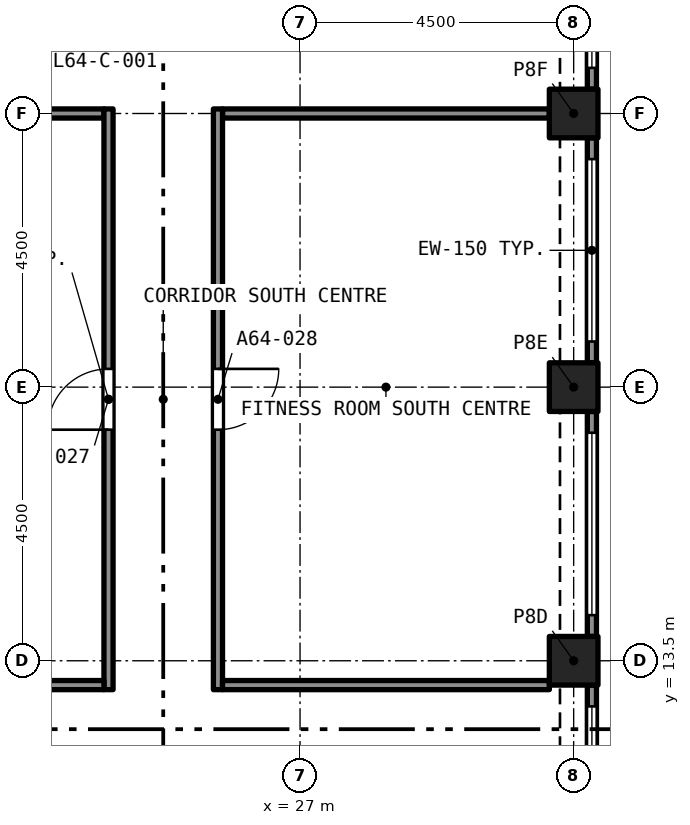
"""IFC4 building model, lengths in metres.
Left out: names, types, materials, properties, quantities, classifications, styles, units other than length and angle.
Written with IfcOpenShell. Run it as: python <this file> out.ifc"""

import sys

from ifc_helpers import new_model, si_unit, direction, frame, frame_2d, origin, origin_2d, place, context, subcontext, project, spatial, rectangle, extrude, element, fill, save


model = new_model("IFC4")
c1 = context("Model", 3, precision=1e-05, world=origin(), true_north=direction((0.0, 1.0)))
c2 = subcontext(c1, "Body", "Model", "MODEL_VIEW")
j1 = project(units=[si_unit("LENGTHUNIT", "METRE"), si_unit("PLANEANGLEUNIT", "RADIAN")], contexts=[c1])
p1 = place(None, origin())
s1 = spatial("IfcSite", under=j1, at=p1, CompositionType="ELEMENT")
p2 = place(p1, origin())
s2 = spatial("IfcBuilding", under=s1, at=p2, CompositionType="ELEMENT")
p3 = place(p2, frame((0.0, 0.0, 229.295)))
s3 = spatial("IfcBuildingStorey", under=s2, at=p3, CompositionType="ELEMENT", Elevation=229.295)
for number, where, z_axis, x_axis in (
    (1, (31.5, 13.5, 0.0), (0.0, 0.0, 1.0), (1.0, 0.0, 0.0)),
    (2, (31.5, 18.0, 0.0), (0.0, 0.0, 1.0), (1.0, 0.0, 0.0)),
    (3, (31.5, 22.5, 0.0), (0.0, 0.0, 1.0), (1.0, 0.0, 0.0)),
):
    element("IfcColumn", number, at=place(p3, frame(where, z_axis=z_axis, x_axis=x_axis)), inside=s3, PredefinedType="COLUMN", context=c2, shape_type="SweptSolid", body=[
        extrude(rectangle(XDim=0.8, YDim=0.8, at=origin_2d()), origin(), (0.0, 0.0, 1.0), 3.2),
    ])
p4 = place(p3, frame((31.8, 13.1, 0.0), z_axis=(0.0, 0.0, 1.0), x_axis=(0.0, -1.0, 0.0)))
e4 = element("IfcWall", 4, at=p4, inside=s3, PredefinedType="SOLIDWALL", context=c2, shape_type="SweptSolid", body=[
    extrude(rectangle(XDim=3.7, YDim=0.15, at=frame_2d((1.85, 0.0))), origin(), (0.0, 0.0, 1.0), 3.2),
])
p5 = place(p4, frame((0.35, 0.0, 0.45)))
e5 = element("IfcOpeningElement", 5, at=p5, cuts=e4, PredefinedType="OPENING", context=c2, shape_type="SweptSolid", body=[
    extrude(rectangle(XDim=3.0, YDim=1.95, at=frame_2d((1.5, 0.975))), frame((0.0, 0.085, 0.0), z_axis=(0.0, -1.0, 0.0), x_axis=(1.0, 0.0, 0.0)), (0.0, 0.0, 1.0), 0.17),
])
p6 = place(p3, frame((31.8, 17.6, 0.0), z_axis=(0.0, 0.0, 1.0), x_axis=(0.0, -1.0, 0.0)))
e6 = element("IfcWall", 6, at=p6, inside=s3, PredefinedType="SOLIDWALL", context=c2, shape_type="SweptSolid", body=[
    extrude(rectangle(XDim=3.7, YDim=0.15, at=frame_2d((1.85, 0.0))), origin(), (0.0, 0.0, 1.0), 3.2),
])
p7 = place(p6, frame((0.35, 0.0, 0.45)))
e7 = element("IfcOpeningElement", 7, at=p7, cuts=e6, PredefinedType="OPENING", context=c2, shape_type="SweptSolid", body=[
    extrude(rectangle(XDim=3.0, YDim=1.95, at=frame_2d((1.5, 0.975))), frame((0.0, 0.085, 0.0), z_axis=(0.0, -1.0, 0.0), x_axis=(1.0, 0.0, 0.0)), (0.0, 0.0, 1.0), 0.17),
])
p8 = place(p3, frame((31.8, 22.1, 0.0), z_axis=(0.0, 0.0, 1.0), x_axis=(0.0, -1.0, 0.0)))
e8 = element("IfcWall", 8, at=p8, inside=s3, PredefinedType="SOLIDWALL", context=c2, shape_type="SweptSolid", body=[
    extrude(rectangle(XDim=3.7, YDim=0.15, at=frame_2d((1.85, 0.0))), origin(), (0.0, 0.0, 1.0), 3.2),
])
p9 = place(p8, frame((0.35, 0.0, 0.45)))
e9 = element("IfcOpeningElement", 9, at=p9, cuts=e8, PredefinedType="OPENING", context=c2, shape_type="SweptSolid", body=[
    extrude(rectangle(XDim=3.0, YDim=1.95, at=frame_2d((1.5, 0.975))), frame((0.0, 0.085, 0.0), z_axis=(0.0, -1.0, 0.0), x_axis=(1.0, 0.0, 0.0)), (0.0, 0.0, 1.0), 0.17),
])
p10 = place(p3, frame((31.8, 26.6, 0.0), z_axis=(0.0, 0.0, 1.0), x_axis=(0.0, -1.0, 0.0)))
e10 = element("IfcWall", 10, at=p10, inside=s3, PredefinedType="SOLIDWALL", context=c2, shape_type="SweptSolid", body=[
    extrude(rectangle(XDim=3.7, YDim=0.15, at=frame_2d((1.85, 0.0))), origin(), (0.0, 0.0, 1.0), 3.2),
])
p11 = place(p10, frame((0.35, 0.0, 0.45)))
e11 = element("IfcOpeningElement", 11, at=p11, cuts=e10, PredefinedType="OPENING", context=c2, shape_type="SweptSolid", body=[
    extrude(rectangle(XDim=3.0, YDim=1.95, at=frame_2d((1.5, 0.975))), frame((0.0, 0.085, 0.0), z_axis=(0.0, -1.0, 0.0), x_axis=(1.0, 0.0, 0.0)), (0.0, 0.0, 1.0), 0.17),
])
for number, where, z_axis, x_axis in (
    (12, (18.4, 22.5, 0.0), (0.0, 0.0, 1.0), (1.0, 0.0, 0.0)),
    (13, (25.725, 22.5, 0.0), (0.0, 0.0, 1.0), (1.0, 0.0, 0.0)),
):
    element("IfcWall", number, at=place(p3, frame(where, z_axis=z_axis, x_axis=x_axis)), inside=s3, PredefinedType="PARTITIONING", context=c2, shape_type="SweptSolid", body=[
        extrude(rectangle(XDim=5.375, YDim=0.15, at=frame_2d((2.688, 0.0))), origin(), (0.0, 0.0, 1.0), 2.75),
    ])
p12 = place(p3, frame((23.85, 13.025, 0.0), z_axis=(0.0, 0.0, 1.0), x_axis=(0.0, 1.0, 0.0)))
e14 = element("IfcWall", 14, at=p12, inside=s3, PredefinedType="PARTITIONING", context=c2, shape_type="SweptSolid", body=[
    extrude(rectangle(XDim=9.55, YDim=0.15, at=frame_2d((4.775, 0.0))), origin(), (0.0, 0.0, 1.0), 2.75),
])
p13 = place(p12, frame((4.275, 0.0, 0.0)))
e15 = element("IfcOpeningElement", 15, at=p13, cuts=e14, PredefinedType="OPENING", context=c2, shape_type="SweptSolid", body=[
    extrude(rectangle(XDim=1.0, YDim=2.1, at=frame_2d((0.5, 1.05))), frame((0.0, 0.085, 0.0), z_axis=(0.0, -1.0, 0.0), x_axis=(1.0, 0.0, 0.0)), (0.0, 0.0, 1.0), 0.17),
])
p14 = place(p3, frame((25.65, 22.575, 0.0), z_axis=(0.0, 0.0, 1.0), x_axis=(0.0, -1.0, 0.0)))
e16 = element("IfcWall", 16, at=p14, inside=s3, PredefinedType="PARTITIONING", context=c2, shape_type="SweptSolid", body=[
    extrude(rectangle(XDim=9.55, YDim=0.15, at=frame_2d((4.775, 0.0))), origin(), (0.0, 0.0, 1.0), 2.75),
])
p15 = place(p14, frame((4.275, 0.0, 0.0)))
e17 = element("IfcOpeningElement", 17, at=p15, cuts=e16, PredefinedType="OPENING", context=c2, shape_type="SweptSolid", body=[
    extrude(rectangle(XDim=1.0, YDim=2.1, at=frame_2d((0.5, 1.05))), frame((0.0, 0.085, 0.0), z_axis=(0.0, -1.0, 0.0), x_axis=(1.0, 0.0, 0.0)), (0.0, 0.0, 1.0), 0.17),
])
for number, where, z_axis, x_axis in (
    (18, (18.4, 13.1, 0.0), (0.0, 0.0, 1.0), (1.0, 0.0, 0.0)),
    (19, (25.725, 13.1, 0.0), (0.0, 0.0, 1.0), (1.0, 0.0, 0.0)),
):
    element("IfcWall", number, at=place(p3, frame(where, z_axis=z_axis, x_axis=x_axis)), inside=s3, PredefinedType="PARTITIONING", context=c2, shape_type="SweptSolid", body=[
        extrude(rectangle(XDim=5.375, YDim=0.15, at=frame_2d((2.688, 0.0))), origin(), (0.0, 0.0, 1.0), 2.75),
    ])
p16 = place(p5, origin())
e20 = element("IfcWindow", 20, at=p16, inside=s3, PartitioningType="SINGLE_PANEL", PredefinedType="WINDOW", context=c2, shape_type="SweptSolid", body=[
    extrude(rectangle(XDim=3.0, YDim=1.95, at=frame_2d((1.5, 0.975))), frame((0.0, 0.03, 0.0), z_axis=(0.0, -1.0, 0.0), x_axis=(1.0, 0.0, 0.0)), (0.0, 0.0, 1.0), 0.06),
])
fill(e5, e20)
p17 = place(p7, origin())
e21 = element("IfcWindow", 21, at=p17, inside=s3, PartitioningType="SINGLE_PANEL", PredefinedType="WINDOW", context=c2, shape_type="SweptSolid", body=[
    extrude(rectangle(XDim=3.0, YDim=1.95, at=frame_2d((1.5, 0.975))), frame((0.0, 0.03, 0.0), z_axis=(0.0, -1.0, 0.0), x_axis=(1.0, 0.0, 0.0)), (0.0, 0.0, 1.0), 0.06),
])
fill(e7, e21)
p18 = place(p9, origin())
e22 = element("IfcWindow", 22, at=p18, inside=s3, PartitioningType="SINGLE_PANEL", PredefinedType="WINDOW", context=c2, shape_type="SweptSolid", body=[
    extrude(rectangle(XDim=3.0, YDim=1.95, at=frame_2d((1.5, 0.975))), frame((0.0, 0.03, 0.0), z_axis=(0.0, -1.0, 0.0), x_axis=(1.0, 0.0, 0.0)), (0.0, 0.0, 1.0), 0.06),
])
fill(e9, e22)
p19 = place(p11, origin())
e23 = element("IfcWindow", 23, at=p19, inside=s3, PartitioningType="SINGLE_PANEL", PredefinedType="WINDOW", context=c2, shape_type="SweptSolid", body=[
    extrude(rectangle(XDim=3.0, YDim=1.95, at=frame_2d((1.5, 0.975))), frame((0.0, 0.03, 0.0), z_axis=(0.0, -1.0, 0.0), x_axis=(1.0, 0.0, 0.0)), (0.0, 0.0, 1.0), 0.06),
])
fill(e11, e23)
p20 = place(p13, origin())
e24 = element("IfcDoor", 24, at=p20, inside=s3, OperationType="SINGLE_SWING_RIGHT", PredefinedType="DOOR", context=c2, shape_type="SweptSolid", body=[
    extrude(rectangle(XDim=1.0, YDim=2.1, at=frame_2d((0.5, 1.05))), frame((0.0, 0.025, 0.0), z_axis=(0.0, -1.0, 0.0), x_axis=(1.0, 0.0, 0.0)), (0.0, 0.0, 1.0), 0.05),
])
fill(e15, e24)
p21 = place(p15, origin())
e25 = element("IfcDoor", 25, at=p21, inside=s3, OperationType="SINGLE_SWING_LEFT", PredefinedType="DOOR", context=c2, shape_type="SweptSolid", body=[
    extrude(rectangle(XDim=1.0, YDim=2.1, at=frame_2d((0.5, 1.05))), frame((0.0, 0.025, 0.0), z_axis=(0.0, -1.0, 0.0), x_axis=(1.0, 0.0, 0.0)), (0.0, 0.0, 1.0), 0.05),
])
fill(e17, e25)
save(model, sys.argv[1])
